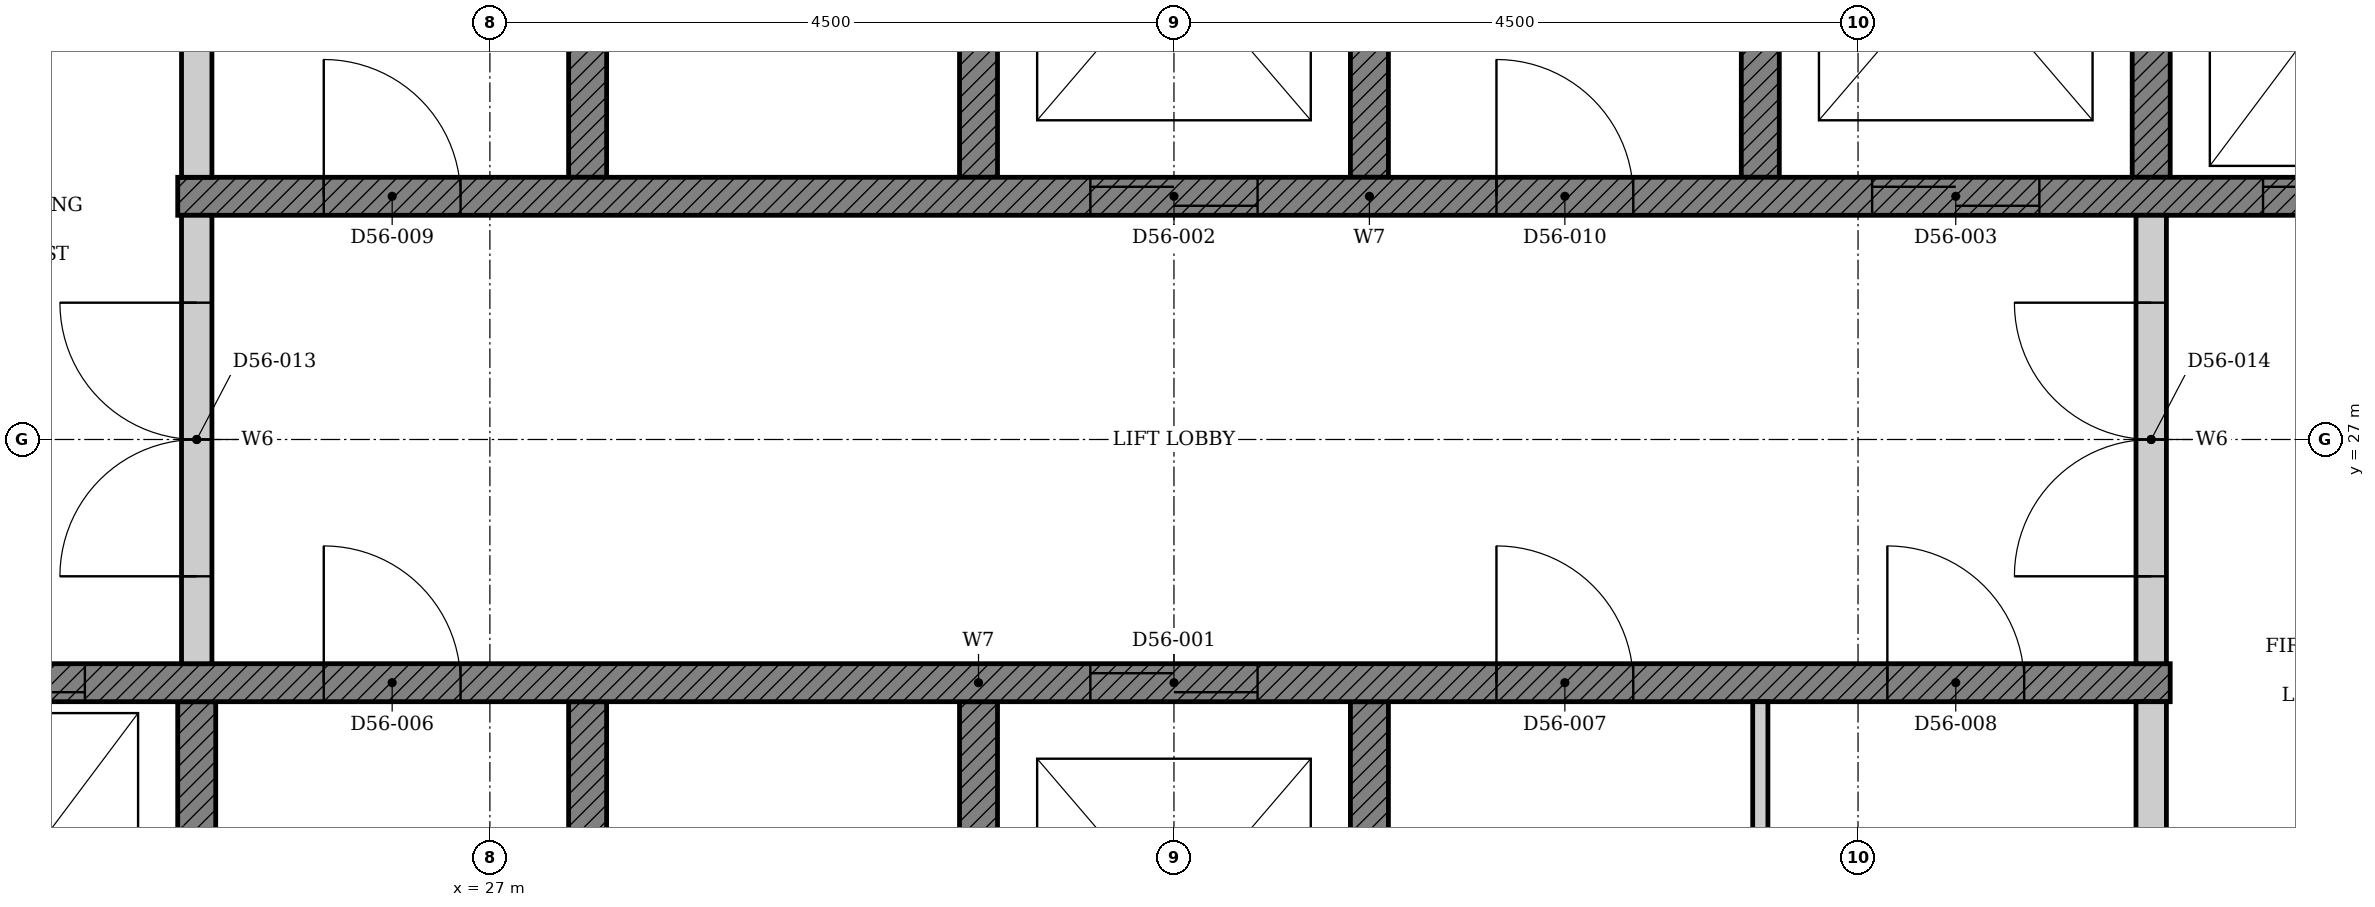
"""IFC4 building model, lengths in metres.
Left out: names, types, materials, properties, quantities, classifications, styles, units other than length and angle.
Written with IfcOpenShell. Run it as: python <this file> out.ifc"""

import sys

from ifc_helpers import new_model, si_unit, direction, frame, frame_2d, origin, place, context, subcontext, project, spatial, polyline, rectangle, outline, extrude, element, fill, save


model = new_model("IFC4")
c1 = context("Model", 3, precision=1e-05, world=origin(), true_north=direction((0.0, 1.0)))
c2 = subcontext(c1, "Body", "Model", "MODEL_VIEW")
j1 = project(units=[si_unit("LENGTHUNIT", "METRE"), si_unit("PLANEANGLEUNIT", "RADIAN")], contexts=[c1])
p1 = place(None, origin())
s1 = spatial("IfcSite", under=j1, at=p1, CompositionType="ELEMENT")
p2 = place(p1, origin())
s2 = spatial("IfcBuilding", under=s1, at=p2, CompositionType="ELEMENT")
p3 = place(p2, frame((0.0, 0.0, 222.0)))
s3 = spatial("IfcBuildingStorey", under=s2, at=p3, CompositionType="ELEMENT", Elevation=222.0)
p4 = place(p3, origin())
e1 = element("IfcWall", 1, at=p4, inside=s3, PredefinedType="SHEAR", context=c2, shape_type="SweptSolid", body=[
    extrude(outline(polyline([(22.375, 22.35), (25.197, 22.35), (25.197, 25.275), (24.947, 25.275), (24.947, 22.65), (22.625, 22.65), (22.625, 25.275), (22.375, 25.275), (22.375, 22.35)])), origin(), (0.0, 0.0, 1.0), 3.4),
])
p5 = place(p3, origin())
e2 = element("IfcWall", 2, at=p5, inside=s3, PredefinedType="SHEAR", context=c2, shape_type="SweptSolid", body=[
    extrude(outline(polyline([(27.518, 22.35), (32.911, 22.35), (32.911, 25.275), (32.661, 25.275), (32.661, 22.65), (30.339, 22.65), (30.339, 25.275), (30.089, 25.275), (30.089, 22.65), (27.768, 22.65), (27.768, 25.275), (27.518, 25.275), (27.518, 22.35)])), origin(), (0.0, 0.0, 1.0), 3.4),
])
p6 = place(p3, origin())
e3 = element("IfcWall", 3, at=p6, inside=s3, PredefinedType="SHEAR", context=c2, shape_type="SweptSolid", body=[
    extrude(outline(polyline([(27.518, 28.725), (27.768, 28.725), (27.768, 31.35), (30.089, 31.35), (30.089, 28.725), (30.339, 28.725), (30.339, 31.35), (32.661, 31.35), (32.661, 28.725), (32.911, 28.725), (32.911, 31.65), (27.518, 31.65), (27.518, 28.725)])), origin(), (0.0, 0.0, 1.0), 3.4),
])
p7 = place(p3, origin())
e4 = element("IfcWall", 4, at=p7, inside=s3, PredefinedType="SHEAR", context=c2, shape_type="SweptSolid", body=[
    extrude(outline(polyline([(35.232, 28.725), (35.482, 28.725), (35.482, 31.35), (37.803, 31.35), (37.803, 28.725), (38.053, 28.725), (38.053, 31.35), (40.375, 31.35), (40.375, 28.725), (40.625, 28.725), (40.625, 31.65), (35.232, 31.65), (35.232, 28.725)])), origin(), (0.0, 0.0, 1.0), 3.4),
])
p8 = place(p3, frame((22.375, 25.4, 0.0), z_axis=(0.0, 0.0, 1.0), x_axis=(1.0, 0.0, 0.0)))
e5 = element("IfcWall", 5, at=p8, inside=s3, PredefinedType="SHEAR", context=c2, shape_type="SweptSolid", body=[
    extrude(rectangle(XDim=15.678, YDim=0.25, at=frame_2d((7.839, 0.0))), origin(), (0.0, 0.0, 1.0), 3.4),
])
p9 = place(p8, frame((8.575, 0.0, 0.0)))
e6 = element("IfcOpeningElement", 6, at=p9, cuts=e5, PredefinedType="OPENING", context=c2, shape_type="SweptSolid", body=[
    extrude(rectangle(XDim=1.1, YDim=2.1, at=frame_2d((0.55, 1.05))), frame((0.0, 0.135, 0.0), z_axis=(0.0, -1.0, 0.0), x_axis=(1.0, 0.0, 0.0)), (0.0, 0.0, 1.0), 0.27),
])
p10 = place(p8, frame((0.861, 0.0, 0.0)))
e7 = element("IfcOpeningElement", 7, at=p10, cuts=e5, PredefinedType="OPENING", context=c2, shape_type="SweptSolid", body=[
    extrude(rectangle(XDim=1.1, YDim=2.1, at=frame_2d((0.55, 1.05))), frame((0.0, 0.135, 0.0), z_axis=(0.0, -1.0, 0.0), x_axis=(1.0, 0.0, 0.0)), (0.0, 0.0, 1.0), 0.27),
])
p11 = place(p8, frame((3.532, 0.0, 0.0)))
e8 = element("IfcOpeningElement", 8, at=p11, cuts=e5, PredefinedType="OPENING", context=c2, shape_type="SweptSolid", body=[
    extrude(rectangle(XDim=0.9, YDim=2.1, at=frame_2d((0.45, 1.05))), frame((0.0, 0.135, 0.0), z_axis=(0.0, -1.0, 0.0), x_axis=(1.0, 0.0, 0.0)), (0.0, 0.0, 1.0), 0.27),
])
p12 = place(p8, frame((11.246, 0.0, 0.0)))
e9 = element("IfcOpeningElement", 9, at=p12, cuts=e5, PredefinedType="OPENING", context=c2, shape_type="SweptSolid", body=[
    extrude(rectangle(XDim=0.9, YDim=2.1, at=frame_2d((0.45, 1.05))), frame((0.0, 0.135, 0.0), z_axis=(0.0, -1.0, 0.0), x_axis=(1.0, 0.0, 0.0)), (0.0, 0.0, 1.0), 0.27),
])
p13 = place(p8, frame((13.818, 0.0, 0.0)))
e10 = element("IfcOpeningElement", 10, at=p13, cuts=e5, PredefinedType="OPENING", context=c2, shape_type="SweptSolid", body=[
    extrude(rectangle(XDim=0.9, YDim=2.1, at=frame_2d((0.45, 1.05))), frame((0.0, 0.135, 0.0), z_axis=(0.0, -1.0, 0.0), x_axis=(1.0, 0.0, 0.0)), (0.0, 0.0, 1.0), 0.27),
])
p14 = place(p3, frame((24.947, 28.6, 0.0), z_axis=(0.0, 0.0, 1.0), x_axis=(1.0, 0.0, 0.0)))
e11 = element("IfcWall", 11, at=p14, inside=s3, PredefinedType="SHEAR", context=c2, shape_type="SweptSolid", body=[
    extrude(rectangle(XDim=15.678, YDim=0.25, at=frame_2d((7.839, 0.0))), origin(), (0.0, 0.0, 1.0), 3.4),
])
p15 = place(p14, frame((6.004, 0.0, 0.0)))
e12 = element("IfcOpeningElement", 12, at=p15, cuts=e11, PredefinedType="OPENING", context=c2, shape_type="SweptSolid", body=[
    extrude(rectangle(XDim=1.1, YDim=2.1, at=frame_2d((0.55, 1.05))), frame((0.0, 0.135, 0.0), z_axis=(0.0, -1.0, 0.0), x_axis=(1.0, 0.0, 0.0)), (0.0, 0.0, 1.0), 0.27),
])
p16 = place(p14, frame((11.146, 0.0, 0.0)))
e13 = element("IfcOpeningElement", 13, at=p16, cuts=e11, PredefinedType="OPENING", context=c2, shape_type="SweptSolid", body=[
    extrude(rectangle(XDim=1.1, YDim=2.1, at=frame_2d((0.55, 1.05))), frame((0.0, 0.135, 0.0), z_axis=(0.0, -1.0, 0.0), x_axis=(1.0, 0.0, 0.0)), (0.0, 0.0, 1.0), 0.27),
])
p17 = place(p14, frame((13.718, 0.0, 0.0)))
e14 = element("IfcOpeningElement", 14, at=p17, cuts=e11, PredefinedType="OPENING", context=c2, shape_type="SweptSolid", body=[
    extrude(rectangle(XDim=1.1, YDim=2.1, at=frame_2d((0.55, 1.05))), frame((0.0, 0.135, 0.0), z_axis=(0.0, -1.0, 0.0), x_axis=(1.0, 0.0, 0.0)), (0.0, 0.0, 1.0), 0.27),
])
p18 = place(p14, frame((0.961, 0.0, 0.0)))
e15 = element("IfcOpeningElement", 15, at=p18, cuts=e11, PredefinedType="OPENING", context=c2, shape_type="SweptSolid", body=[
    extrude(rectangle(XDim=0.9, YDim=2.1, at=frame_2d((0.45, 1.05))), frame((0.0, 0.135, 0.0), z_axis=(0.0, -1.0, 0.0), x_axis=(1.0, 0.0, 0.0)), (0.0, 0.0, 1.0), 0.27),
])
p19 = place(p14, frame((8.675, 0.0, 0.0)))
e16 = element("IfcOpeningElement", 16, at=p19, cuts=e11, PredefinedType="OPENING", context=c2, shape_type="SweptSolid", body=[
    extrude(rectangle(XDim=0.9, YDim=2.1, at=frame_2d((0.45, 1.05))), frame((0.0, 0.135, 0.0), z_axis=(0.0, -1.0, 0.0), x_axis=(1.0, 0.0, 0.0)), (0.0, 0.0, 1.0), 0.27),
])
p20 = place(p3, frame((37.928, 22.65, 0.0), z_axis=(0.0, 0.0, 1.0), x_axis=(0.0, 1.0, 0.0)))
e17 = element("IfcWall", 17, at=p20, inside=s3, PredefinedType="PARTITIONING", context=c2, shape_type="SweptSolid", body=[
    extrude(rectangle(XDim=2.625, YDim=0.2, at=frame_2d((1.312, 0.0))), origin(), (0.0, 0.0, 1.0), 3.4),
])
p21 = place(p3, frame((35.357, 22.65, 0.0), z_axis=(0.0, 0.0, 1.0), x_axis=(0.0, 1.0, 0.0)))
e18 = element("IfcWall", 18, at=p21, inside=s3, PredefinedType="PARTITIONING", context=c2, shape_type="SweptSolid", body=[
    extrude(rectangle(XDim=2.625, YDim=0.1, at=frame_2d((1.312, 0.0))), origin(), (0.0, 0.0, 1.0), 3.4),
])
p22 = place(p3, frame((25.072, 28.725, 0.0), z_axis=(0.0, 0.0, 1.0), x_axis=(0.0, 1.0, 0.0)))
e19 = element("IfcWall", 19, at=p22, inside=s3, PredefinedType="PARTITIONING", context=c2, shape_type="SweptSolid", body=[
    extrude(rectangle(XDim=2.625, YDim=0.2, at=frame_2d((1.312, 0.0))), origin(), (0.0, 0.0, 1.0), 3.4),
])
p23 = place(p3, frame((25.072, 25.525, 0.0), z_axis=(0.0, 0.0, 1.0), x_axis=(0.0, 1.0, 0.0)))
e20 = element("IfcWall", 20, at=p23, inside=s3, PredefinedType="PARTITIONING", context=c2, shape_type="SweptSolid", body=[
    extrude(rectangle(XDim=2.95, YDim=0.2, at=frame_2d((1.475, 0.0))), origin(), (0.0, 0.0, 1.0), 3.4),
])
p24 = place(p23, frame((0.575, 0.0, 0.0)))
e21 = element("IfcOpeningElement", 21, at=p24, cuts=e20, PredefinedType="OPENING", context=c2, shape_type="SweptSolid", body=[
    extrude(rectangle(XDim=1.8, YDim=2.1, at=frame_2d((0.9, 1.05))), frame((0.0, 0.11, 0.0), z_axis=(0.0, -1.0, 0.0), x_axis=(1.0, 0.0, 0.0)), (0.0, 0.0, 1.0), 0.22),
])
p25 = place(p3, frame((37.928, 25.525, 0.0), z_axis=(0.0, 0.0, 1.0), x_axis=(0.0, 1.0, 0.0)))
e22 = element("IfcWall", 22, at=p25, inside=s3, PredefinedType="PARTITIONING", context=c2, shape_type="SweptSolid", body=[
    extrude(rectangle(XDim=2.95, YDim=0.2, at=frame_2d((1.475, 0.0))), origin(), (0.0, 0.0, 1.0), 3.4),
])
p26 = place(p25, frame((0.575, 0.0, 0.0)))
e23 = element("IfcOpeningElement", 23, at=p26, cuts=e22, PredefinedType="OPENING", context=c2, shape_type="SweptSolid", body=[
    extrude(rectangle(XDim=1.8, YDim=2.1, at=frame_2d((0.9, 1.05))), frame((0.0, 0.11, 0.0), z_axis=(0.0, -1.0, 0.0), x_axis=(1.0, 0.0, 0.0)), (0.0, 0.0, 1.0), 0.22),
])
p27 = place(p9, origin())
e24 = element("IfcDoor", 24, at=p27, inside=s3, OperationType="DOUBLE_DOOR_SLIDING", PredefinedType="DOOR", context=c2, shape_type="SweptSolid", body=[
    extrude(rectangle(XDim=1.1, YDim=2.1, at=frame_2d((0.55, 1.05))), frame((0.0, 0.025, 0.0), z_axis=(0.0, -1.0, 0.0), x_axis=(1.0, 0.0, 0.0)), (0.0, 0.0, 1.0), 0.05),
])
fill(e6, e24)
p28 = place(p15, origin())
e25 = element("IfcDoor", 25, at=p28, inside=s3, OperationType="DOUBLE_DOOR_SLIDING", PredefinedType="DOOR", context=c2, shape_type="SweptSolid", body=[
    extrude(rectangle(XDim=1.1, YDim=2.1, at=frame_2d((0.55, 1.05))), frame((0.0, 0.025, 0.0), z_axis=(0.0, -1.0, 0.0), x_axis=(1.0, 0.0, 0.0)), (0.0, 0.0, 1.0), 0.05),
])
fill(e12, e25)
p29 = place(p16, origin())
e26 = element("IfcDoor", 26, at=p29, inside=s3, OperationType="DOUBLE_DOOR_SLIDING", PredefinedType="DOOR", context=c2, shape_type="SweptSolid", body=[
    extrude(rectangle(XDim=1.1, YDim=2.1, at=frame_2d((0.55, 1.05))), frame((0.0, 0.025, 0.0), z_axis=(0.0, -1.0, 0.0), x_axis=(1.0, 0.0, 0.0)), (0.0, 0.0, 1.0), 0.05),
])
fill(e13, e26)
p30 = place(p10, origin())
e27 = element("IfcDoor", 27, at=p30, inside=s3, OperationType="DOUBLE_DOOR_SLIDING", PredefinedType="DOOR", context=c2, shape_type="SweptSolid", body=[
    extrude(rectangle(XDim=1.1, YDim=2.1, at=frame_2d((0.55, 1.05))), frame((0.0, 0.025, 0.0), z_axis=(0.0, -1.0, 0.0), x_axis=(1.0, 0.0, 0.0)), (0.0, 0.0, 1.0), 0.05),
])
fill(e7, e27)
p31 = place(p17, origin())
e28 = element("IfcDoor", 28, at=p31, inside=s3, OperationType="DOUBLE_DOOR_SLIDING", PredefinedType="DOOR", context=c2, shape_type="SweptSolid", body=[
    extrude(rectangle(XDim=1.1, YDim=2.1, at=frame_2d((0.55, 1.05))), frame((0.0, 0.025, 0.0), z_axis=(0.0, -1.0, 0.0), x_axis=(1.0, 0.0, 0.0)), (0.0, 0.0, 1.0), 0.05),
])
fill(e14, e28)
p32 = place(p11, origin())
e29 = element("IfcDoor", 29, at=p32, inside=s3, OperationType="SINGLE_SWING_LEFT", PredefinedType="DOOR", context=c2, shape_type="SweptSolid", body=[
    extrude(rectangle(XDim=0.9, YDim=2.1, at=frame_2d((0.45, 1.05))), frame((0.0, 0.025, 0.0), z_axis=(0.0, -1.0, 0.0), x_axis=(1.0, 0.0, 0.0)), (0.0, 0.0, 1.0), 0.05),
])
fill(e8, e29)
p33 = place(p12, origin())
e30 = element("IfcDoor", 30, at=p33, inside=s3, OperationType="SINGLE_SWING_LEFT", PredefinedType="DOOR", context=c2, shape_type="SweptSolid", body=[
    extrude(rectangle(XDim=0.9, YDim=2.1, at=frame_2d((0.45, 1.05))), frame((0.0, 0.025, 0.0), z_axis=(0.0, -1.0, 0.0), x_axis=(1.0, 0.0, 0.0)), (0.0, 0.0, 1.0), 0.05),
])
fill(e9, e30)
p34 = place(p13, origin())
e31 = element("IfcDoor", 31, at=p34, inside=s3, OperationType="SINGLE_SWING_LEFT", PredefinedType="DOOR", context=c2, shape_type="SweptSolid", body=[
    extrude(rectangle(XDim=0.9, YDim=2.1, at=frame_2d((0.45, 1.05))), frame((0.0, 0.025, 0.0), z_axis=(0.0, -1.0, 0.0), x_axis=(1.0, 0.0, 0.0)), (0.0, 0.0, 1.0), 0.05),
])
fill(e10, e31)
p35 = place(p18, origin())
e32 = element("IfcDoor", 32, at=p35, inside=s3, OperationType="SINGLE_SWING_LEFT", PredefinedType="DOOR", context=c2, shape_type="SweptSolid", body=[
    extrude(rectangle(XDim=0.9, YDim=2.1, at=frame_2d((0.45, 1.05))), frame((0.0, 0.025, 0.0), z_axis=(0.0, -1.0, 0.0), x_axis=(1.0, 0.0, 0.0)), (0.0, 0.0, 1.0), 0.05),
])
fill(e15, e32)
p36 = place(p19, origin())
e33 = element("IfcDoor", 33, at=p36, inside=s3, OperationType="SINGLE_SWING_LEFT", PredefinedType="DOOR", context=c2, shape_type="SweptSolid", body=[
    extrude(rectangle(XDim=0.9, YDim=2.1, at=frame_2d((0.45, 1.05))), frame((0.0, 0.025, 0.0), z_axis=(0.0, -1.0, 0.0), x_axis=(1.0, 0.0, 0.0)), (0.0, 0.0, 1.0), 0.05),
])
fill(e16, e33)
p37 = place(p24, origin())
e34 = element("IfcDoor", 34, at=p37, inside=s3, OperationType="DOUBLE_DOOR_SINGLE_SWING", PredefinedType="DOOR", context=c2, shape_type="SweptSolid", body=[
    extrude(rectangle(XDim=1.8, YDim=2.1, at=frame_2d((0.9, 1.05))), frame((0.0, 0.025, 0.0), z_axis=(0.0, -1.0, 0.0), x_axis=(1.0, 0.0, 0.0)), (0.0, 0.0, 1.0), 0.05),
])
fill(e21, e34)
p38 = place(p26, origin())
e35 = element("IfcDoor", 35, at=p38, inside=s3, OperationType="DOUBLE_DOOR_SINGLE_SWING", PredefinedType="DOOR", context=c2, shape_type="SweptSolid", body=[
    extrude(rectangle(XDim=1.8, YDim=2.1, at=frame_2d((0.9, 1.05))), frame((0.0, 0.025, 0.0), z_axis=(0.0, -1.0, 0.0), x_axis=(1.0, 0.0, 0.0)), (0.0, 0.0, 1.0), 0.05),
])
fill(e23, e35)
save(model, sys.argv[1])
